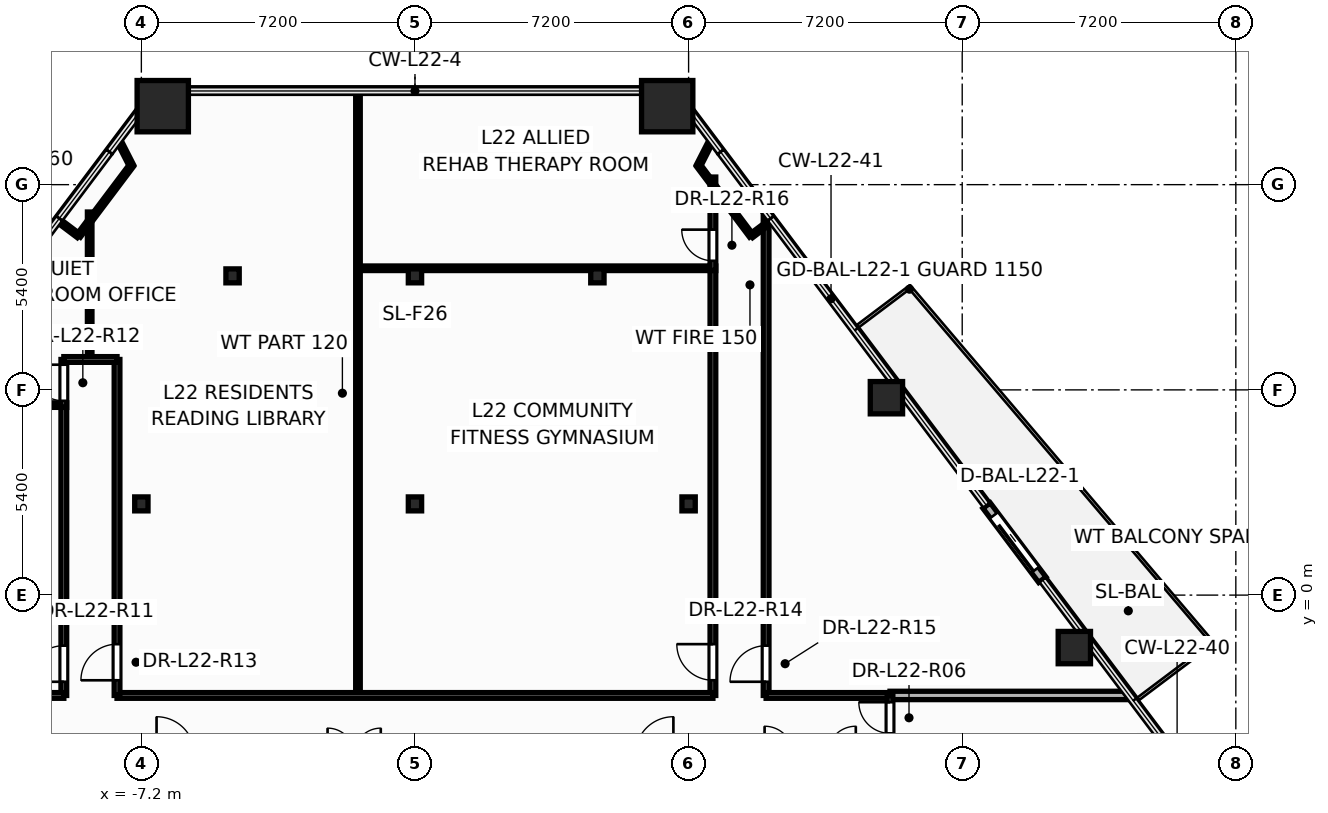
"""IFC4 building model, lengths in metres.
Left out: names, types, materials, properties, quantities, classifications, styles, units other than length and angle.
Written with IfcOpenShell. Run it as: python <this file> out.ifc"""

import sys

from ifc_helpers import new_model, si_unit, direction, frame, frame_2d, origin, origin_2d, place, context, subcontext, project, spatial, rectangle, hollow_rectangle, hollow_circle, i_section, extrude, element, fill, save


model = new_model("IFC4")
c1 = context("Model", 3, precision=1e-05, world=origin(), true_north=direction((0.0, 1.0)))
c2 = subcontext(c1, "Body", "Model", "MODEL_VIEW")
j1 = project(units=[si_unit("LENGTHUNIT", "METRE"), si_unit("PLANEANGLEUNIT", "RADIAN")], contexts=[c1])
p1 = place(None, origin())
s1 = spatial("IfcSite", under=j1, at=p1, CompositionType="ELEMENT")
p2 = place(p1, origin())
s2 = spatial("IfcBuilding", under=s1, at=p2, CompositionType="ELEMENT")
p3 = place(p2, frame((0.0, 0.0, 86.4)))
s3 = spatial("IfcBuildingStorey", under=s2, at=p3, CompositionType="ELEMENT", Elevation=86.4)
for number, where, z_axis, x_axis in (
    (1, (6.637, 12.865, 0.0), (0.0, 0.0, 1.0), (1.0, 0.0, 0.0)),
    (2, (-6.637, 12.865, 0.0), (0.0, 0.0, 1.0), (1.0, 0.0, 0.0)),
):
    element("IfcColumn", number, at=place(p3, frame(where, z_axis=z_axis, x_axis=x_axis)), inside=s3, PredefinedType="COLUMN", context=c2, shape_type="SweptSolid", body=[
        extrude(hollow_rectangle(XDim=1.35, YDim=1.35, WallThickness=0.065, at=origin_2d()), origin(), (0.0, 0.0, 1.0), 3.6),
    ])
for number, where, z_axis, x_axis in (
    (3, (17.351, -1.381, 0.0), (0.0, 0.0, 1.0), (1.0, 0.0, 0.0)),
    (4, (12.406, 5.194, 0.0), (0.0, 0.0, 1.0), (1.0, 0.0, 0.0)),
):
    element("IfcColumn", number, at=place(p3, frame(where, z_axis=z_axis, x_axis=x_axis)), inside=s3, PredefinedType="COLUMN", context=c2, shape_type="SweptSolid", body=[
        extrude(hollow_circle(Radius=0.425, WallThickness=0.038, at=origin_2d()), origin(), (0.0, 0.0, 1.0), 3.6),
    ])
for number, where, z_axis, x_axis in (
    (5, (-7.2, 2.4, 0.0), (0.0, 0.0, 1.0), (1.0, 0.0, 0.0)),
    (6, (0.0, 2.4, 0.0), (0.0, 0.0, 1.0), (1.0, 0.0, 0.0)),
    (7, (7.2, 2.4, 0.0), (0.0, 0.0, 1.0), (1.0, 0.0, 0.0)),
    (8, (-4.8, 8.4, 0.0), (0.0, 0.0, 1.0), (1.0, 0.0, 0.0)),
    (9, (0.0, 8.4, 0.0), (0.0, 0.0, 1.0), (1.0, 0.0, 0.0)),
    (10, (4.8, 8.4, 0.0), (0.0, 0.0, 1.0), (1.0, 0.0, 0.0)),
):
    element("IfcColumn", number, at=place(p3, frame(where, z_axis=z_axis, x_axis=x_axis)), inside=s3, PredefinedType="COLUMN", context=c2, shape_type="SweptSolid", body=[
        extrude(i_section(OverallWidth=0.35, OverallDepth=0.367, WebThickness=0.025, FlangeThickness=0.032, at=origin_2d()), origin(), (0.0, 0.0, 1.0), 3.6),
    ])
p4 = place(p3, frame((16.508, 0.405, -0.015), z_axis=(0.0, 0.0, 1.0), x_axis=(-0.601008208177, 0.799242850268, 0.0)))
e11 = element("IfcWall", 11, at=p4, inside=s3, PredefinedType="STANDARD", context=c2, shape_type="SweptSolid", body=[
    extrude(rectangle(XDim=2.44, YDim=0.24, at=frame_2d((1.22, 0.0))), origin(), (0.0, 0.0, 1.0), 2.658),
])
p5 = place(p4, frame((0.32, 0.0, 0.015)))
e12 = element("IfcOpeningElement", 12, at=p5, cuts=e11, PredefinedType="OPENING", context=c2, shape_type="SweptSolid", body=[
    extrude(rectangle(XDim=1.806, YDim=2.204, at=frame_2d((0.9, 1.102))), frame((0.0, 0.13, 0.0), z_axis=(0.0, -1.0, 0.0), x_axis=(1.0, 0.0, 0.0)), (0.0, 0.0, 1.0), 0.26),
])
p6 = place(p3, frame((9.24, -2.64, 0.0), z_axis=(0.0, 0.0, 1.0), x_axis=(0.0, 1.0, 0.0)))
e13 = element("IfcWall", 13, at=p6, inside=s3, PredefinedType="PARTITIONING", context=c2, shape_type="SweptSolid", body=[
    extrude(rectangle(XDim=12.709, YDim=0.15, at=frame_2d((6.354, 0.0))), origin(), (0.0, 0.0, 1.0), 2.439),
])
p7 = place(p6, frame((0.36, 0.0, 0.0)))
e14 = element("IfcOpeningElement", 14, at=p7, cuts=e13, PredefinedType="OPENING", context=c2, shape_type="SweptSolid", body=[
    extrude(rectangle(XDim=0.956, YDim=2.104, at=frame_2d((0.475, 1.052))), frame((0.0, 0.085, 0.0), z_axis=(0.0, -1.0, 0.0), x_axis=(1.0, 0.0, 0.0)), (0.0, 0.0, 1.0), 0.17),
])
p8 = place(p3, frame((7.84, -2.64, 0.0), z_axis=(0.0, 0.0, 1.0), x_axis=(0.0, 1.0, 0.0)))
e15 = element("IfcWall", 15, at=p8, inside=s3, PredefinedType="PARTITIONING", context=c2, shape_type="SweptSolid", body=[
    extrude(rectangle(XDim=11.3, YDim=0.15, at=frame_2d((5.65, 0.0))), origin(), (0.0, 0.0, 1.0), 2.439),
])
p9 = place(p8, frame((0.4, 0.0, 0.0)))
e16 = element("IfcOpeningElement", 16, at=p9, cuts=e15, PredefinedType="OPENING", context=c2, shape_type="SweptSolid", body=[
    extrude(rectangle(XDim=0.956, YDim=2.104, at=frame_2d((0.475, 1.052))), frame((0.0, 0.085, 0.0), z_axis=(0.0, -1.0, 0.0), x_axis=(1.0, 0.0, 0.0)), (0.0, 0.0, 1.0), 0.17),
])
p10 = place(p3, frame((-1.5, -2.64, 0.0), z_axis=(0.0, 0.0, 1.0), x_axis=(0.0, 1.0, 0.0)))
e17 = element("IfcWall", 17, at=p10, inside=s3, PredefinedType="PARTITIONING", context=c2, shape_type="SweptSolid", body=[
    extrude(rectangle(XDim=15.905, YDim=0.12, at=frame_2d((7.953, 0.0))), origin(), (0.0, 0.0, 1.0), 2.255),
])
p11 = place(p3, frame((-7.84, -2.64, 0.0), z_axis=(0.0, 0.0, 1.0), x_axis=(1.0, 0.0, 0.0)))
e18 = element("IfcWall", 18, at=p11, inside=s3, PredefinedType="PARTITIONING", context=c2, shape_type="SweptSolid", body=[
    extrude(rectangle(XDim=15.68, YDim=0.15, at=frame_2d((7.84, 0.0))), origin(), (0.0, 0.0, 1.0), 2.255),
])
p12 = place(p3, frame((-1.5, 8.6, 0.0), z_axis=(0.0, 0.0, 1.0), x_axis=(1.0, 0.0, 0.0)))
e19 = element("IfcWall", 19, at=p12, inside=s3, PredefinedType="PARTITIONING", context=c2, shape_type="SweptSolid", body=[
    extrude(rectangle(XDim=9.34, YDim=0.12, at=frame_2d((4.67, 0.0))), origin(), (0.0, 0.0, 1.0), 2.439),
])
p13 = place(p3, frame((-7.84, -2.64, 0.0), z_axis=(0.0, 0.0, 1.0), x_axis=(0.0, 1.0, 0.0)))
e20 = element("IfcWall", 20, at=p13, inside=s3, PredefinedType="PARTITIONING", context=c2, shape_type="SweptSolid", body=[
    extrude(rectangle(XDim=8.84, YDim=0.15, at=frame_2d((4.42, 0.0))), origin(), (0.0, 0.0, 1.0), 2.439),
])
p14 = place(p13, frame((0.399, 0.0, 0.0)))
e21 = element("IfcOpeningElement", 21, at=p14, cuts=e20, PredefinedType="OPENING", context=c2, shape_type="SweptSolid", body=[
    extrude(rectangle(XDim=0.956, YDim=2.104, at=frame_2d((0.475, 1.052))), frame((0.0, 0.085, 0.0), z_axis=(0.0, -1.0, 0.0), x_axis=(1.0, 0.0, 0.0)), (0.0, 0.0, 1.0), 0.17),
])
p15 = place(p3, frame((-9.24, -2.64, 0.0), z_axis=(0.0, 0.0, 1.0), x_axis=(0.0, 1.0, 0.0)))
e22 = element("IfcWall", 22, at=p15, inside=s3, PredefinedType="PARTITIONING", context=c2, shape_type="SweptSolid", body=[
    extrude(rectangle(XDim=7.7, YDim=0.15, at=frame_2d((3.85, 0.0))), origin(), (0.0, 0.0, 1.0), 2.439),
])
p16 = place(p15, frame((0.36, 0.0, 0.0)))
e23 = element("IfcOpeningElement", 23, at=p16, cuts=e22, PredefinedType="OPENING", context=c2, shape_type="SweptSolid", body=[
    extrude(rectangle(XDim=0.956, YDim=2.104, at=frame_2d((0.475, 1.052))), frame((0.0, 0.085, 0.0), z_axis=(0.0, -1.0, 0.0), x_axis=(1.0, 0.0, 0.0)), (0.0, 0.0, 1.0), 0.17),
])
p17 = place(p3, frame((12.5, -2.64, 0.0), z_axis=(0.0, 0.0, 1.0), x_axis=(1.0, 0.0, 0.0)))
e24 = element("IfcWall", 24, at=p17, inside=s3, PredefinedType="PARTITIONING", context=c2, shape_type="SweptSolid", body=[
    extrude(rectangle(XDim=6.298, YDim=0.22, at=frame_2d((3.149, 0.0))), origin(), (0.0, 0.0, 1.0), 2.644),
])
p18 = place(p3, frame((-8.56, 6.2, 0.0), z_axis=(0.0, 0.0, 1.0), x_axis=(0.0, 1.0, 0.0)))
e25 = element("IfcWall", 25, at=p18, inside=s3, PredefinedType="PARTITIONING", context=c2, shape_type="SweptSolid", body=[
    extrude(rectangle(XDim=3.88, YDim=0.12, at=frame_2d((1.94, 0.0))), origin(), (0.0, 0.0, 1.0), 2.439),
])
p19 = place(p3, frame((-13.052, 5.0, 0.0), z_axis=(0.0, 0.0, 1.0), x_axis=(1.0, 0.0, 0.0)))
e26 = element("IfcWall", 26, at=p19, inside=s3, PredefinedType="PARTITIONING", context=c2, shape_type="SweptSolid", body=[
    extrude(rectangle(XDim=3.812, YDim=0.12, at=frame_2d((1.906, 0.0))), origin(), (0.0, 0.0, 1.0), 2.439),
])
for number, where, z_axis, x_axis in (
    (27, (-12.5, -2.64, 0.0), (0.0, 0.0, 1.0), (1.0, 0.0, 0.0)),
    (28, (9.24, -2.64, 0.0), (0.0, 0.0, 1.0), (1.0, 0.0, 0.0)),
):
    element("IfcWall", number, at=place(p3, frame(where, z_axis=z_axis, x_axis=x_axis)), inside=s3, PredefinedType="PARTITIONING", context=c2, shape_type="SweptSolid", body=[
        extrude(rectangle(XDim=3.26, YDim=0.15, at=frame_2d((1.63, 0.0))), origin(), (0.0, 0.0, 1.0), 3.28),
    ])
p20 = place(p3, frame((7.84, 8.54, 0.0), z_axis=(0.0, 0.0, 1.0), x_axis=(0.0, 1.0, 0.0)))
e29 = element("IfcWall", 29, at=p20, inside=s3, PredefinedType="PARTITIONING", context=c2, shape_type="SweptSolid", body=[
    extrude(rectangle(XDim=2.46, YDim=0.15, at=frame_2d((1.23, 0.0))), origin(), (0.0, 0.0, 1.0), 3.28),
])
p21 = place(p20, frame((0.256, 0.0, 0.0)))
e30 = element("IfcOpeningElement", 30, at=p21, cuts=e29, PredefinedType="OPENING", context=c2, shape_type="SweptSolid", body=[
    extrude(rectangle(XDim=0.826, YDim=2.104, at=frame_2d((0.41, 1.052))), frame((0.0, 0.085, 0.0), z_axis=(0.0, -1.0, 0.0), x_axis=(1.0, 0.0, 0.0)), (0.0, 0.0, 1.0), 0.17),
])
for number, where, z_axis, x_axis in (
    (31, (-7.462, 11.302, 0.0), (0.0, 0.0, 1.0), (-0.601, -0.799, 0.0)),
    (32, (8.851, 9.455, 0.0), (0.0, 0.0, 1.0), (-0.601, 0.799, 0.0)),
):
    element("IfcWall", number, at=place(p3, frame(where, z_axis=z_axis, x_axis=x_axis)), inside=s3, PredefinedType="PARTITIONING", context=c2, shape_type="SweptSolid", body=[
        extrude(rectangle(XDim=2.312, YDim=0.12, at=frame_2d((1.156, 0.0))), origin(), (0.0, 0.0, 1.0), 3.28),
    ])
p22 = place(p3, frame((12.5, -4.24, 0.0), z_axis=(0.0, 0.0, 1.0), x_axis=(0.0, 1.0, 0.0)))
e33 = element("IfcWall", 33, at=p22, inside=s3, PredefinedType="PARTITIONING", context=c2, shape_type="SweptSolid", body=[
    extrude(rectangle(XDim=1.6, YDim=0.15, at=frame_2d((0.8, 0.0))), origin(), (0.0, 0.0, 1.0), 2.255),
])
p23 = place(p22, frame((0.602, 0.0, 0.0)))
e34 = element("IfcOpeningElement", 34, at=p23, cuts=e33, PredefinedType="OPENING", context=c2, shape_type="SweptSolid", body=[
    extrude(rectangle(XDim=0.826, YDim=2.104, at=frame_2d((0.41, 1.052))), frame((0.0, 0.085, 0.0), z_axis=(0.0, -1.0, 0.0), x_axis=(1.0, 0.0, 0.0)), (0.0, 0.0, 1.0), 0.17),
])
p24 = place(p3, frame((-9.24, 4.94, 0.0), z_axis=(0.0, 0.0, 1.0), x_axis=(0.0, 1.0, 0.0)))
e35 = element("IfcWall", 35, at=p24, inside=s3, PredefinedType="PARTITIONING", context=c2, shape_type="SweptSolid", body=[
    extrude(rectangle(XDim=1.26, YDim=0.15, at=frame_2d((0.63, 0.0))), origin(), (0.0, 0.0, 1.0), 3.28),
])
p25 = place(p24, frame((0.173, 0.0, 0.0)))
e36 = element("IfcOpeningElement", 36, at=p25, cuts=e35, PredefinedType="OPENING", context=c2, shape_type="SweptSolid", body=[
    extrude(rectangle(XDim=0.956, YDim=2.104, at=frame_2d((0.475, 1.052))), frame((0.0, 0.085, 0.0), z_axis=(0.0, -1.0, 0.0), x_axis=(1.0, 0.0, 0.0)), (0.0, 0.0, 1.0), 0.17),
])
p26 = place(p3, frame((-9.24, 6.2, 0.0), z_axis=(0.0, 0.0, 1.0), x_axis=(1.0, 0.0, 0.0)))
e37 = element("IfcWall", 37, at=p26, inside=s3, PredefinedType="PARTITIONING", context=c2, shape_type="SweptSolid", body=[
    extrude(rectangle(XDim=1.4, YDim=0.15, at=frame_2d((0.7, 0.0))), origin(), (0.0, 0.0, 1.0), 3.28),
])
for number, where, z_axis, x_axis in (
    (38, (-7.801, 11.967, 0.0), (0.0, 0.0, 1.0), (0.454, -0.891, 0.0)),
    (39, (7.462, 11.302, 0.0), (0.0, 0.0, 1.0), (0.454, 0.891, 0.0)),
):
    element("IfcWall", number, at=place(p3, frame(where, z_axis=z_axis, x_axis=x_axis)), inside=s3, PredefinedType="PARTITIONING", context=c2, shape_type="SweptSolid", body=[
        extrude(rectangle(XDim=0.746, YDim=0.12, at=frame_2d((0.373, 0.0))), origin(), (0.0, 0.0, 1.0), 2.644),
    ])
for number, where, z_axis, x_axis in (
    (40, (-8.851, 9.455, 0.0), (0.0, 0.0, 1.0), (-0.799, 0.601, 0.0)),
    (41, (9.387, 9.858, 0.0), (0.0, 0.0, 1.0), (-0.799, -0.601, 0.0)),
):
    element("IfcWall", number, at=place(p3, frame(where, z_axis=z_axis, x_axis=x_axis)), inside=s3, PredefinedType="PARTITIONING", context=c2, shape_type="SweptSolid", body=[
        extrude(rectangle(XDim=0.67, YDim=0.12, at=frame_2d((0.335, 0.0))), origin(), (0.0, 0.0, 1.0), 2.644),
    ])
p27 = place(p5, origin())
e42 = element("IfcDoor", 42, at=p27, inside=s3, OperationType="SLIDING_TO_LEFT", PredefinedType="DOOR", context=c2, shape_type="SweptSolid", body=[
    extrude(rectangle(XDim=1.8, YDim=2.2, at=frame_2d((0.9, 1.1))), frame((0.0, 0.025, 0.0), z_axis=(0.0, -1.0, 0.0), x_axis=(1.0, 0.0, 0.0)), (0.0, 0.0, 1.0), 0.05),
])
fill(e12, e42)
p28 = place(p23, origin())
e43 = element("IfcDoor", 43, at=p28, inside=s3, OperationType="SINGLE_SWING_RIGHT", PredefinedType="DOOR", context=c2, shape_type="SweptSolid", body=[
    extrude(rectangle(XDim=0.82, YDim=2.1, at=frame_2d((0.41, 1.05))), frame((0.0, 0.025, 0.0), z_axis=(0.0, -1.0, 0.0), x_axis=(1.0, 0.0, 0.0)), (0.0, 0.0, 1.0), 0.05),
])
fill(e34, e43)
p29 = place(p16, origin())
e44 = element("IfcDoor", 44, at=p29, inside=s3, OperationType="SINGLE_SWING_LEFT", PredefinedType="DOOR", context=c2, shape_type="SweptSolid", body=[
    extrude(rectangle(XDim=0.95, YDim=2.1, at=frame_2d((0.475, 1.05))), frame((0.0, 0.025, 0.0), z_axis=(0.0, -1.0, 0.0), x_axis=(1.0, 0.0, 0.0)), (0.0, 0.0, 1.0), 0.05),
])
fill(e23, e44)
p30 = place(p25, origin())
e45 = element("IfcDoor", 45, at=p30, inside=s3, OperationType="SINGLE_SWING_RIGHT", PredefinedType="DOOR", context=c2, shape_type="SweptSolid", body=[
    extrude(rectangle(XDim=0.95, YDim=2.1, at=frame_2d((0.475, 1.05))), frame((0.0, 0.025, 0.0), z_axis=(0.0, -1.0, 0.0), x_axis=(1.0, 0.0, 0.0)), (0.0, 0.0, 1.0), 0.05),
])
fill(e36, e45)
p31 = place(p14, origin())
e46 = element("IfcDoor", 46, at=p31, inside=s3, OperationType="SINGLE_SWING_LEFT", PredefinedType="DOOR", context=c2, shape_type="SweptSolid", body=[
    extrude(rectangle(XDim=0.95, YDim=2.1, at=frame_2d((0.475, 1.05))), frame((0.0, 0.025, 0.0), z_axis=(0.0, -1.0, 0.0), x_axis=(1.0, 0.0, 0.0)), (0.0, 0.0, 1.0), 0.05),
])
fill(e21, e46)
p32 = place(p9, origin())
e47 = element("IfcDoor", 47, at=p32, inside=s3, OperationType="SINGLE_SWING_RIGHT", PredefinedType="DOOR", context=c2, shape_type="SweptSolid", body=[
    extrude(rectangle(XDim=0.95, YDim=2.1, at=frame_2d((0.475, 1.05))), frame((0.0, 0.025, 0.0), z_axis=(0.0, -1.0, 0.0), x_axis=(1.0, 0.0, 0.0)), (0.0, 0.0, 1.0), 0.05),
])
fill(e16, e47)
p33 = place(p7, origin())
e48 = element("IfcDoor", 48, at=p33, inside=s3, OperationType="SINGLE_SWING_LEFT", PredefinedType="DOOR", context=c2, shape_type="SweptSolid", body=[
    extrude(rectangle(XDim=0.95, YDim=2.1, at=frame_2d((0.475, 1.05))), frame((0.0, 0.025, 0.0), z_axis=(0.0, -1.0, 0.0), x_axis=(1.0, 0.0, 0.0)), (0.0, 0.0, 1.0), 0.05),
])
fill(e14, e48)
p34 = place(p21, origin())
e49 = element("IfcDoor", 49, at=p34, inside=s3, OperationType="SINGLE_SWING_RIGHT", PredefinedType="DOOR", context=c2, shape_type="SweptSolid", body=[
    extrude(rectangle(XDim=0.82, YDim=2.1, at=frame_2d((0.41, 1.05))), frame((0.0, 0.025, 0.0), z_axis=(0.0, -1.0, 0.0), x_axis=(1.0, 0.0, 0.0)), (0.0, 0.0, 1.0), 0.05),
])
fill(e30, e49)
save(model, sys.argv[1])
